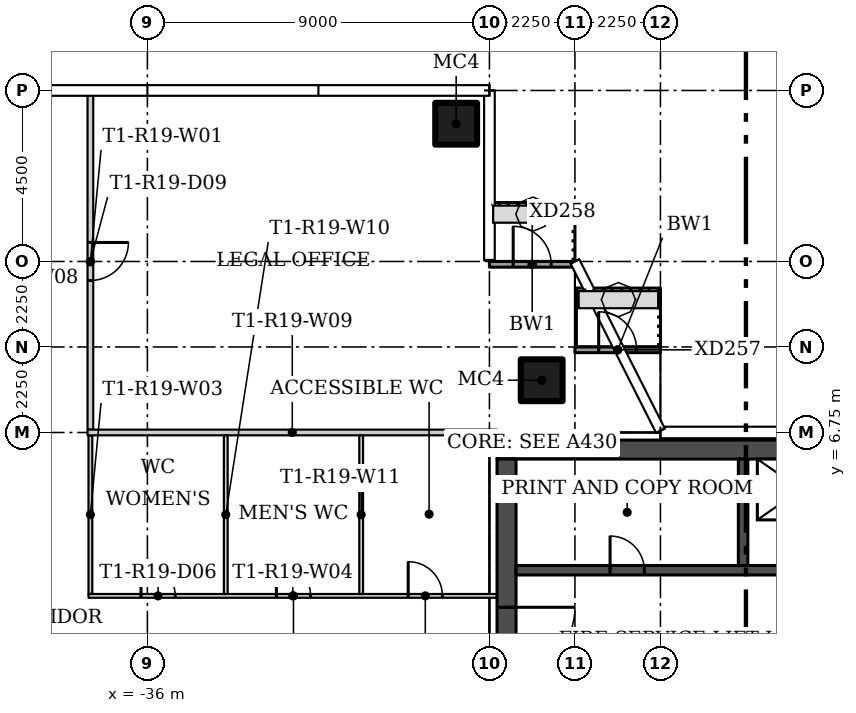
"""IFC4 building model, lengths in metres.
Left out: names, types, materials, properties, quantities, classifications, styles, units other than length and angle.
Written with IfcOpenShell. Run it as: python <this file> out.ifc"""

import sys

from ifc_helpers import new_model, si_unit, direction, frame, frame_2d, origin, origin_2d, place, context, subcontext, project, spatial, rectangle, hollow_rectangle, extrude, element, fill, save


model = new_model("IFC4")
c1 = context("Model", 3, precision=1e-05, world=origin(), true_north=direction((0.0, 1.0)))
c2 = subcontext(c1, "Body", "Model", "MODEL_VIEW")
j1 = project(units=[si_unit("LENGTHUNIT", "METRE"), si_unit("PLANEANGLEUNIT", "RADIAN")], contexts=[c1])
p1 = place(None, origin())
s1 = spatial("IfcSite", under=j1, at=p1, CompositionType="ELEMENT")
p2 = place(p1, origin())
s2 = spatial("IfcBuilding", under=s1, at=p2, CompositionType="ELEMENT")
p3 = place(p2, frame((0.0, 0.0, 174.0)))
s3 = spatial("IfcBuildingStorey", under=s2, at=p3, CompositionType="ELEMENT", Elevation=174.0)
for number, where in (
    (1, (-25.625, 8.125, 0.0)),
    (2, (-27.875, 14.875, 0.0)),
):
    element("IfcColumn", number, at=place(p3, frame(where)), inside=s3, PredefinedType="COLUMN", context=c2, shape_type="SweptSolid", body=[
        extrude(hollow_rectangle(XDim=1.1, YDim=1.1, WallThickness=0.04, at=origin_2d()), origin(), (0.0, 0.0, 1.0), 3.45),
    ])
p4 = place(p3, frame((-37.5, 15.655, 0.0), z_axis=(0.0, 0.0, 1.0), x_axis=(0.0, -1.0, 0.0)))
e3 = element("IfcWall", 3, at=p4, inside=s3, PredefinedType="PARTITIONING", context=c2, shape_type="SweptSolid", body=[
    extrude(rectangle(XDim=8.83, YDim=0.15, at=frame_2d((4.415, 0.0))), origin(), (0.0, 0.0, 1.0), 3.45),
])
p5 = place(p4, frame((3.905, 0.0, 0.0)))
e4 = element("IfcOpeningElement", 4, at=p5, cuts=e3, PredefinedType="OPENING", context=c2, shape_type="SweptSolid", body=[
    extrude(rectangle(XDim=1.0, YDim=2.4, at=frame_2d((0.5, 1.2))), frame((0.0, 0.085, 0.0), z_axis=(0.0, -1.0, 0.0), x_axis=(1.0, 0.0, 0.0)), (0.0, 0.0, 1.0), 0.17),
])
p6 = place(p3, frame((-37.5, 6.675, 0.0), z_axis=(0.0, 0.0, 1.0), x_axis=(0.0, -1.0, 0.0)))
e5 = element("IfcWall", 5, at=p6, inside=s3, PredefinedType="PARTITIONING", context=c2, shape_type="SweptSolid", body=[
    extrude(rectangle(XDim=4.175, YDim=0.1, at=frame_2d((2.087, 0.0))), origin(), (0.0, 0.0, 1.0), 3.45),
])
p7 = place(p3, frame((-37.55, 2.45, 0.0)))
e6 = element("IfcWall", 6, at=p7, inside=s3, PredefinedType="PARTITIONING", context=c2, shape_type="SweptSolid", body=[
    extrude(rectangle(XDim=10.75, YDim=0.1, at=frame_2d((5.375, 0.0))), origin(), (0.0, 0.0, 1.0), 3.45),
])
p8 = place(p7, frame((1.381, 0.0, 0.0)))
e7 = element("IfcOpeningElement", 7, at=p8, cuts=e6, PredefinedType="OPENING", context=c2, shape_type="SweptSolid", body=[
    extrude(rectangle(XDim=0.9, YDim=2.1, at=frame_2d((0.45, 1.05))), frame((0.0, 0.06, 0.0), z_axis=(0.0, -1.0, 0.0), x_axis=(1.0, 0.0, 0.0)), (0.0, 0.0, 1.0), 0.12),
])
p9 = place(p7, frame((4.944, 0.0, 0.0)))
e8 = element("IfcOpeningElement", 8, at=p9, cuts=e6, PredefinedType="OPENING", context=c2, shape_type="SweptSolid", body=[
    extrude(rectangle(XDim=0.9, YDim=2.1, at=frame_2d((0.45, 1.05))), frame((0.0, 0.06, 0.0), z_axis=(0.0, -1.0, 0.0), x_axis=(1.0, 0.0, 0.0)), (0.0, 0.0, 1.0), 0.12),
])
p10 = place(p7, frame((8.413, 0.0, 0.0)))
e9 = element("IfcOpeningElement", 9, at=p10, cuts=e6, PredefinedType="OPENING", context=c2, shape_type="SweptSolid", body=[
    extrude(rectangle(XDim=0.9, YDim=2.1, at=frame_2d((0.45, 1.05))), frame((0.0, 0.06, 0.0), z_axis=(0.0, -1.0, 0.0), x_axis=(1.0, 0.0, 0.0)), (0.0, 0.0, 1.0), 0.12),
])
p11 = place(p3, frame((-37.575, 6.75, 0.0)))
e10 = element("IfcWall", 10, at=p11, inside=s3, PredefinedType="PARTITIONING", context=c2, shape_type="SweptSolid", body=[
    extrude(rectangle(XDim=10.775, YDim=0.15, at=frame_2d((5.387, 0.0))), origin(), (0.0, 0.0, 1.0), 3.45),
])
for number, where, z_axis, x_axis in (
    (11, (-33.938, 2.5, 0.0), (0.0, 0.0, 1.0), (0.0, 1.0, 0.0)),
    (12, (-30.375, 2.5, 0.0), (0.0, 0.0, 1.0), (0.0, 1.0, 0.0)),
):
    element("IfcWall", number, at=place(p3, frame(where, z_axis=z_axis, x_axis=x_axis)), inside=s3, PredefinedType="PARTITIONING", context=c2, shape_type="SweptSolid", body=[
        extrude(rectangle(XDim=4.175, YDim=0.1, at=frame_2d((2.087, 0.0))), origin(), (0.0, 0.0, 1.0), 3.45),
    ])
p12 = place(p3, frame((-24.75, 8.925, 0.0)))
e13 = element("IfcWall", 13, at=p12, inside=s3, PredefinedType="SOLIDWALL", context=c2, shape_type="SweptSolid", body=[
    extrude(rectangle(XDim=2.25, YDim=0.15, at=frame_2d((1.125, 0.0))), origin(), (0.0, 0.0, 1.0), 3.45),
])
p13 = place(p12, frame((0.625, 0.0, 0.0)))
e14 = element("IfcOpeningElement", 14, at=p13, cuts=e13, PredefinedType="OPENING", context=c2, shape_type="SweptSolid", body=[
    extrude(rectangle(XDim=1.0, YDim=2.4, at=frame_2d((0.5, 1.2))), frame((0.0, 0.085, 0.0), z_axis=(0.0, -1.0, 0.0), x_axis=(1.0, 0.0, 0.0)), (0.0, 0.0, 1.0), 0.17),
])
p14 = place(p3, frame((-27.0, 11.175, 0.0)))
e15 = element("IfcWall", 15, at=p14, inside=s3, PredefinedType="SOLIDWALL", context=c2, shape_type="SweptSolid", body=[
    extrude(rectangle(XDim=2.25, YDim=0.15, at=frame_2d((1.125, 0.0))), origin(), (0.0, 0.0, 1.0), 3.45),
])
p15 = place(p14, frame((0.625, 0.0, 0.0)))
e16 = element("IfcOpeningElement", 16, at=p15, cuts=e15, PredefinedType="OPENING", context=c2, shape_type="SweptSolid", body=[
    extrude(rectangle(XDim=1.0, YDim=2.4, at=frame_2d((0.5, 1.2))), frame((0.0, 0.085, 0.0), z_axis=(0.0, -1.0, 0.0), x_axis=(1.0, 0.0, 0.0)), (0.0, 0.0, 1.0), 0.17),
])
p16 = place(p3, frame((-26.8, 6.3, 0.0)))
e17 = element("IfcWall", 17, at=p16, inside=s3, PredefinedType="SHEAR", context=c2, shape_type="SweptSolid", body=[
    extrude(rectangle(XDim=13.1, YDim=0.5, at=frame_2d((6.55, 0.0))), origin(), (0.0, 0.0, 1.0), 3.45),
])
p17 = place(p3, frame((-26.55, 6.05, 0.0), z_axis=(0.0, 0.0, 1.0), x_axis=(0.0, -1.0, 0.0)))
e18 = element("IfcWall", 18, at=p17, inside=s3, PredefinedType="SHEAR", context=c2, shape_type="SweptSolid", body=[
    extrude(rectangle(XDim=12.1, YDim=0.5, at=frame_2d((6.05, 0.0))), origin(), (0.0, 0.0, 1.0), 3.45),
])
p18 = place(p17, frame((3.9, 0.0, 0.0)))
e19 = element("IfcOpeningElement", 19, at=p18, cuts=e18, PredefinedType="OPENING", context=c2, shape_type="SweptSolid", body=[
    extrude(rectangle(XDim=1.8, YDim=2.4, at=frame_2d((0.9, 1.2))), frame((0.0, 0.26, 0.0), z_axis=(0.0, -1.0, 0.0), x_axis=(1.0, 0.0, 0.0)), (0.0, 0.0, 1.0), 0.52),
])
p19 = place(p3, frame((-26.3, 3.125, 0.0)))
e20 = element("IfcWall", 20, at=p19, inside=s3, PredefinedType="SHEAR", context=c2, shape_type="SweptSolid", body=[
    extrude(rectangle(XDim=12.1, YDim=0.25, at=frame_2d((6.05, 0.0))), origin(), (0.0, 0.0, 1.0), 3.45),
])
p20 = place(p19, frame((6.95, 0.0, 0.0)))
e21 = element("IfcOpeningElement", 21, at=p20, cuts=e20, PredefinedType="OPENING", context=c2, shape_type="SweptSolid", body=[
    extrude(rectangle(XDim=1.1, YDim=2.1, at=frame_2d((0.55, 1.05))), frame((0.0, 0.135, 0.0), z_axis=(0.0, -1.0, 0.0), x_axis=(1.0, 0.0, 0.0)), (0.0, 0.0, 1.0), 0.27),
])
p21 = place(p19, frame((10.075, 0.0, 0.0)))
e22 = element("IfcOpeningElement", 22, at=p21, cuts=e20, PredefinedType="OPENING", context=c2, shape_type="SweptSolid", body=[
    extrude(rectangle(XDim=1.1, YDim=2.1, at=frame_2d((0.55, 1.05))), frame((0.0, 0.135, 0.0), z_axis=(0.0, -1.0, 0.0), x_axis=(1.0, 0.0, 0.0)), (0.0, 0.0, 1.0), 0.27),
])
p22 = place(p19, frame((2.475, 0.0, 0.0)))
e23 = element("IfcOpeningElement", 23, at=p22, cuts=e20, PredefinedType="OPENING", context=c2, shape_type="SweptSolid", body=[
    extrude(rectangle(XDim=0.9, YDim=2.1, at=frame_2d((0.45, 1.05))), frame((0.0, 0.135, 0.0), z_axis=(0.0, -1.0, 0.0), x_axis=(1.0, 0.0, 0.0)), (0.0, 0.0, 1.0), 0.27),
])
p23 = place(p3, frame((-20.325, 3.25, 0.0), z_axis=(0.0, 0.0, 1.0), x_axis=(0.0, 1.0, 0.0)))
e24 = element("IfcWall", 24, at=p23, inside=s3, PredefinedType="SHEAR", context=c2, shape_type="SweptSolid", body=[
    extrude(rectangle(XDim=2.8, YDim=0.25, at=frame_2d((1.4, 0.0))), origin(), (0.0, 0.0, 1.0), 3.45),
])
p24 = place(p8, origin())
e25 = element("IfcDoor", 25, at=p24, inside=s3, OperationType="SINGLE_SWING_LEFT", PredefinedType="DOOR", context=c2, shape_type="SweptSolid", body=[
    extrude(rectangle(XDim=0.9, YDim=2.1, at=frame_2d((0.45, 1.05))), frame((0.0, 0.025, 0.0), z_axis=(0.0, -1.0, 0.0), x_axis=(1.0, 0.0, 0.0)), (0.0, 0.0, 1.0), 0.05),
])
fill(e7, e25)
p25 = place(p9, origin())
e26 = element("IfcDoor", 26, at=p25, inside=s3, OperationType="SINGLE_SWING_LEFT", PredefinedType="DOOR", context=c2, shape_type="SweptSolid", body=[
    extrude(rectangle(XDim=0.9, YDim=2.1, at=frame_2d((0.45, 1.05))), frame((0.0, 0.025, 0.0), z_axis=(0.0, -1.0, 0.0), x_axis=(1.0, 0.0, 0.0)), (0.0, 0.0, 1.0), 0.05),
])
fill(e8, e26)
p26 = place(p10, origin())
e27 = element("IfcDoor", 27, at=p26, inside=s3, OperationType="SINGLE_SWING_RIGHT", PredefinedType="DOOR", context=c2, shape_type="SweptSolid", body=[
    extrude(rectangle(XDim=0.9, YDim=2.1, at=frame_2d((0.45, 1.05))), frame((0.0, 0.025, 0.0), z_axis=(0.0, -1.0, 0.0), x_axis=(1.0, 0.0, 0.0)), (0.0, 0.0, 1.0), 0.05),
])
fill(e9, e27)
p27 = place(p5, origin())
e28 = element("IfcDoor", 28, at=p27, inside=s3, OperationType="SINGLE_SWING_RIGHT", PredefinedType="DOOR", context=c2, shape_type="SweptSolid", body=[
    extrude(rectangle(XDim=1.0, YDim=2.4, at=frame_2d((0.5, 1.2))), frame((0.0, 0.025, 0.0), z_axis=(0.0, -1.0, 0.0), x_axis=(1.0, 0.0, 0.0)), (0.0, 0.0, 1.0), 0.05),
])
fill(e4, e28)
p28 = place(p13, origin())
e29 = element("IfcDoor", 29, at=p28, inside=s3, OperationType="SINGLE_SWING_RIGHT", PredefinedType="DOOR", context=c2, shape_type="SweptSolid", body=[
    extrude(rectangle(XDim=1.0, YDim=2.4, at=frame_2d((0.5, 1.2))), frame((0.0, 0.025, 0.0), z_axis=(0.0, -1.0, 0.0), x_axis=(1.0, 0.0, 0.0)), (0.0, 0.0, 1.0), 0.05),
])
fill(e14, e29)
p29 = place(p15, origin())
e30 = element("IfcDoor", 30, at=p29, inside=s3, OperationType="SINGLE_SWING_LEFT", PredefinedType="DOOR", context=c2, shape_type="SweptSolid", body=[
    extrude(rectangle(XDim=1.0, YDim=2.4, at=frame_2d((0.5, 1.2))), frame((0.0, 0.025, 0.0), z_axis=(0.0, -1.0, 0.0), x_axis=(1.0, 0.0, 0.0)), (0.0, 0.0, 1.0), 0.05),
])
fill(e16, e30)
p30 = place(p18, origin())
e31 = element("IfcDoor", 31, at=p30, inside=s3, OperationType="DOUBLE_DOOR_SINGLE_SWING", PredefinedType="DOOR", context=c2, shape_type="SweptSolid", body=[
    extrude(rectangle(XDim=1.8, YDim=2.4, at=frame_2d((0.9, 1.2))), frame((0.0, 0.025, 0.0), z_axis=(0.0, -1.0, 0.0), x_axis=(1.0, 0.0, 0.0)), (0.0, 0.0, 1.0), 0.05),
])
fill(e19, e31)
p31 = place(p22, origin())
e32 = element("IfcDoor", 32, at=p31, inside=s3, OperationType="SINGLE_SWING_LEFT", PredefinedType="DOOR", context=c2, shape_type="SweptSolid", body=[
    extrude(rectangle(XDim=0.9, YDim=2.1, at=frame_2d((0.45, 1.05))), frame((0.0, 0.025, 0.0), z_axis=(0.0, -1.0, 0.0), x_axis=(1.0, 0.0, 0.0)), (0.0, 0.0, 1.0), 0.05),
])
fill(e23, e32)
save(model, sys.argv[1])
